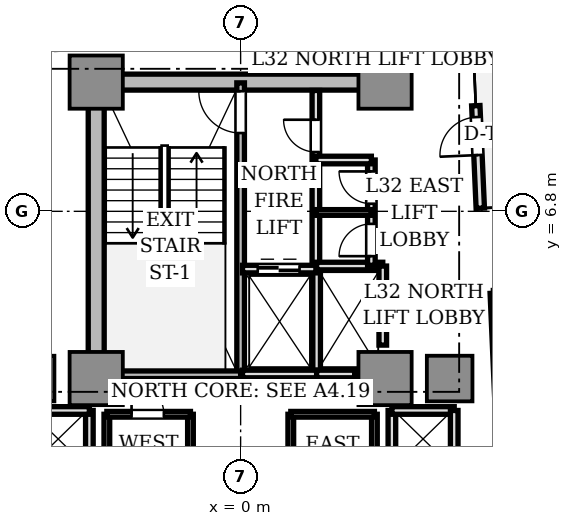
"""IFC4 building model, lengths in metres.
Left out: names, types, materials, properties, quantities, classifications, styles, units other than length and angle.
Written with IfcOpenShell. Run it as: python <this file> out.ifc"""

import sys

from ifc_helpers import new_model, si_unit, direction, frame, frame_2d, origin, origin_2d, place, context, subcontext, project, spatial, rectangle, extrude, source, transform, mapped, element, fill, save


model = new_model("IFC4")
c1 = context("Model", 3, precision=1e-05, world=origin(), true_north=direction((0.0, 1.0)))
c2 = subcontext(c1, "Body", "Model", "MODEL_VIEW")
j1 = project(units=[si_unit("LENGTHUNIT", "METRE"), si_unit("PLANEANGLEUNIT", "RADIAN")], contexts=[c1])
p1 = place(None, origin())
s1 = spatial("IfcSite", under=j1, at=p1, CompositionType="ELEMENT")
p2 = place(p1, origin())
s2 = spatial("IfcBuilding", under=s1, at=p2, CompositionType="ELEMENT")
p3 = place(p2, frame((0.0, 0.0, 118.15)))
s3 = spatial("IfcBuildingStorey", under=s2, at=p3, CompositionType="ELEMENT", Elevation=118.15)
p4 = place(p3, frame((-3.55, 10.2, 0.0), z_axis=(0.0, 0.0, 1.0), x_axis=(1.0, 0.0, 0.0)))
e1 = element("IfcWall", 1, at=p4, inside=s3, PredefinedType="SHEAR", context=c2, shape_type="SweptSolid", body=[
    extrude(rectangle(XDim=7.1, YDim=0.42, at=frame_2d((3.55, 0.0))), origin(), (0.0, 0.0, 1.0), 3.11),
])
p5 = place(p3, frame((-3.8, 2.85, 0.0), z_axis=(0.0, 0.0, 1.0), x_axis=(0.0, 1.0, 0.0)))
e2 = element("IfcWall", 2, at=p5, inside=s3, PredefinedType="SHEAR", context=c2, shape_type="SweptSolid", body=[
    extrude(rectangle(XDim=6.9, YDim=0.42, at=frame_2d((3.45, 0.0))), origin(), (0.0, 0.0, 1.0), 3.11),
])
m1 = source(origin(), c2, "Body", "SweptSolid", [
    extrude(rectangle(XDim=1.4, YDim=1.4, at=origin_2d()), origin(), (0.0, 0.0, 1.0), 3.11),
])
for number, where, z_axis, x_axis in (
    (3, (-3.8, 2.4, 0.0), (0.0, 0.0, 1.0), (1.0, 0.0, 0.0)),
    (4, (3.8, 2.4, 0.0), (0.0, 0.0, 1.0), (1.0, 0.0, 0.0)),
    (5, (-3.8, 10.2, 0.0), (0.0, 0.0, 1.0), (1.0, 0.0, 0.0)),
    (6, (3.8, 10.2, 0.0), (0.0, 0.0, 1.0), (1.0, 0.0, 0.0)),
):
    element("IfcColumn", number, at=place(p3, frame(where, z_axis=z_axis, x_axis=x_axis)), inside=s3, PredefinedType="COLUMN", context=c2, shape_type="MappedRepresentation", body=[
        mapped(m1, transform((0.0, 0.0, 0.0), scale=1.0)),
    ])
m2 = source(origin(), c2, "Body", "SweptSolid", [
    extrude(rectangle(XDim=1.2, YDim=1.2, at=origin_2d()), origin(), (0.0, 0.0, 1.0), 3.11),
])
for number, where, z_axis, x_axis in (
    (7, (5.5, 2.4, 0.0), (0.0, 0.0, 1.0), (1.0, 0.0, 0.0)),
    (8, (-5.5, 2.4, 0.0), (0.0, 0.0, 1.0), (1.0, 0.0, 0.0)),
):
    element("IfcColumn", number, at=place(p3, frame(where, z_axis=z_axis, x_axis=x_axis)), inside=s3, PredefinedType="COLUMN", context=c2, shape_type="MappedRepresentation", body=[
        mapped(m2, transform((0.0, 0.0, 0.0), scale=1.0)),
    ])
p6 = place(p3, frame((6.306, 6.882, 0.0), z_axis=(0.0, 0.0, 1.0), x_axis=(-0.043672655174, 0.999045894436, 0.0)))
e9 = element("IfcWall", 9, at=p6, inside=s3, PredefinedType="STANDARD", context=c2, shape_type="SweptSolid", body=[
    extrude(rectangle(XDim=2.7, YDim=0.22, at=frame_2d((1.35, 0.0))), origin(), (0.0, 0.0, 1.0), 3.11),
])
p7 = place(p6, frame((1.4, 0.0, 0.0)))
e10 = element("IfcOpeningElement", 10, at=p7, cuts=e9, PredefinedType="OPENING", context=c2, shape_type="SweptSolid", body=[
    extrude(rectangle(XDim=1.0, YDim=2.2, at=frame_2d((0.5, 1.1))), frame((0.0, 0.12, 0.0), z_axis=(0.0, -1.0, 0.0), x_axis=(1.0, 0.0, 0.0)), (0.0, 0.0, 1.0), 0.24),
])
p8 = place(p3, frame((0.0, 2.5, 0.0), z_axis=(0.0, 0.0, 1.0), x_axis=(0.0, 1.0, 0.0)))
e11 = element("IfcWall", 11, at=p8, inside=s3, PredefinedType="SOLIDWALL", context=c2, shape_type="SweptSolid", body=[
    extrude(rectangle(XDim=7.68, YDim=0.2, at=frame_2d((3.84, 0.0))), origin(), (0.0, 0.0, 1.0), 3.11),
])
p9 = place(p8, frame((6.36, 0.0, 0.0)))
e12 = element("IfcOpeningElement", 12, at=p9, cuts=e11, PredefinedType="OPENING", context=c2, shape_type="SweptSolid", body=[
    extrude(rectangle(XDim=1.1, YDim=2.15, at=frame_2d((0.55, 1.075))), frame((0.0, 0.11, 0.0), z_axis=(0.0, -1.0, 0.0), x_axis=(1.0, 0.0, 0.0)), (0.0, 0.0, 1.0), 0.22),
])
p10 = place(p3, frame((-3.72, 2.5, 0.0), z_axis=(0.0, 0.0, 1.0), x_axis=(1.0, 0.0, 0.0)))
e13 = element("IfcWall", 13, at=p10, inside=s3, PredefinedType="SOLIDWALL", context=c2, shape_type="SweptSolid", body=[
    extrude(rectangle(XDim=3.72, YDim=0.2, at=frame_2d((1.86, 0.0))), origin(), (0.0, 0.0, 1.0), 3.11),
])
p11 = place(p3, frame((1.98, 5.32, 0.0), z_axis=(0.0, 0.0, 1.0), x_axis=(0.0, 1.0, 0.0)))
e14 = element("IfcWall", 14, at=p11, inside=s3, PredefinedType="SOLIDWALL", context=c2, shape_type="SweptSolid", body=[
    extrude(rectangle(XDim=4.66, YDim=0.2, at=frame_2d((2.33, 0.0))), origin(), (0.0, 0.0, 1.0), 2.66),
])
p12 = place(p11, frame((3.04, 0.0, 0.0)))
e15 = element("IfcOpeningElement", 15, at=p12, cuts=e14, PredefinedType="OPENING", context=c2, shape_type="SweptSolid", body=[
    extrude(rectangle(XDim=0.85, YDim=2.1, at=frame_2d((0.425, 1.05))), frame((0.0, 0.11, 0.0), z_axis=(0.0, -1.0, 0.0), x_axis=(1.0, 0.0, 0.0)), (0.0, 0.0, 1.0), 0.22),
])
p13 = place(p3, frame((2.0, 2.5, 0.0), z_axis=(0.0, 0.0, 1.0), x_axis=(0.0, 1.0, 0.0)))
e16 = element("IfcWall", 16, at=p13, inside=s3, PredefinedType="SOLIDWALL", context=c2, shape_type="SweptSolid", body=[
    extrude(rectangle(XDim=2.78, YDim=0.2, at=frame_2d((1.39, 0.0))), origin(), (0.0, 0.0, 1.0), 2.66),
])
p14 = place(p3, frame((0.05, 2.52, 0.0), z_axis=(0.0, 0.0, 1.0), x_axis=(1.0, 0.0, 0.0)))
e17 = element("IfcWall", 17, at=p14, inside=s3, PredefinedType="SOLIDWALL", context=c2, shape_type="SweptSolid", body=[
    extrude(rectangle(XDim=1.95, YDim=0.2, at=frame_2d((0.975, 0.0))), origin(), (0.0, 0.0, 1.0), 2.66),
])
p15 = place(p3, frame((0.05, 5.28, 0.0), z_axis=(0.0, 0.0, 1.0), x_axis=(1.0, 0.0, 0.0)))
e18 = element("IfcWall", 18, at=p15, inside=s3, PredefinedType="SOLIDWALL", context=c2, shape_type="SweptSolid", body=[
    extrude(rectangle(XDim=1.93, YDim=0.2, at=frame_2d((0.965, 0.0))), origin(), (0.0, 0.0, 1.0), 2.66),
])
p16 = place(p15, frame((0.4, 0.0, 0.0)))
e19 = element("IfcOpeningElement", 19, at=p16, cuts=e18, PredefinedType="OPENING", context=c2, shape_type="SweptSolid", body=[
    extrude(rectangle(XDim=1.1, YDim=2.2, at=frame_2d((0.55, 1.1))), frame((0.0, 0.11, 0.0), z_axis=(0.0, -1.0, 0.0), x_axis=(1.0, 0.0, 0.0)), (0.0, 0.0, 1.0), 0.22),
])
p17 = place(p3, frame((2.0, 2.52, 0.0), z_axis=(0.0, 0.0, 1.0), x_axis=(1.0, 0.0, 0.0)))
e20 = element("IfcWall", 20, at=p17, inside=s3, PredefinedType="SOLIDWALL", context=c2, shape_type="SweptSolid", body=[
    extrude(rectangle(XDim=1.0, YDim=0.2, at=frame_2d((0.5, 0.0))), origin(), (0.0, 0.0, 1.0), 2.66),
])
p18 = place(p3, frame((2.0, 5.36, 0.0), z_axis=(0.0, 0.0, 1.0), x_axis=(1.0, 0.0, 0.0)))
e21 = element("IfcWall", 21, at=p18, inside=s3, PredefinedType="SOLIDWALL", context=c2, shape_type="SweptSolid", body=[
    extrude(rectangle(XDim=1.74, YDim=0.2, at=frame_2d((0.87, 0.0))), origin(), (0.0, 0.0, 1.0), 2.66),
])
p19 = place(p3, frame((3.74, 3.28, 0.0), z_axis=(0.0, 0.0, 1.0), x_axis=(0.0, 1.0, 0.0)))
e22 = element("IfcWall", 22, at=p19, inside=s3, PredefinedType="SOLIDWALL", context=c2, shape_type="SweptSolid", body=[
    extrude(rectangle(XDim=2.08, YDim=0.2, at=frame_2d((1.04, 0.0))), origin(), (0.0, 0.0, 1.0), 2.66),
])
p20 = place(p19, frame((0.44, 0.0, 0.0)))
e23 = element("IfcOpeningElement", 23, at=p20, cuts=e22, PredefinedType="OPENING", context=c2, shape_type="SweptSolid", body=[
    extrude(rectangle(XDim=1.2, YDim=2.2, at=frame_2d((0.6, 1.1))), frame((0.0, 0.11, 0.0), z_axis=(0.0, -1.0, 0.0), x_axis=(1.0, 0.0, 0.0)), (0.0, 0.0, 1.0), 0.22),
])
p21 = place(p3, frame((3.98, -1.56, 0.0), z_axis=(0.0, 0.0, 1.0), x_axis=(0.0, 1.0, 0.0)))
e24 = element("IfcWall", 24, at=p21, inside=s3, PredefinedType="SOLIDWALL", context=c2, shape_type="SweptSolid", body=[
    extrude(rectangle(XDim=3.12, YDim=0.2, at=frame_2d((1.56, 0.0))), origin(), (0.0, 0.0, 1.0), 2.28),
])
p22 = place(p3, frame((3.98, 1.56, 0.0), z_axis=(0.0, 0.0, 1.0), x_axis=(1.0, 0.0, 0.0)))
e25 = element("IfcWall", 25, at=p22, inside=s3, PredefinedType="SOLIDWALL", context=c2, shape_type="SweptSolid", body=[
    extrude(rectangle(XDim=1.64, YDim=0.2, at=frame_2d((0.82, 0.0))), origin(), (0.0, 0.0, 1.0), 2.66),
])
p23 = place(p3, frame((5.62, 0.0, 0.0), z_axis=(0.0, 0.0, 1.0), x_axis=(0.0, 1.0, 0.0)))
e26 = element("IfcWall", 26, at=p23, inside=s3, PredefinedType="SOLIDWALL", context=c2, shape_type="SweptSolid", body=[
    extrude(rectangle(XDim=1.56, YDim=0.2, at=frame_2d((0.78, 0.0))), origin(), (0.0, 0.0, 1.0), 2.66),
])
p24 = place(p3, frame((-3.98, -1.56, 0.0), z_axis=(0.0, 0.0, 1.0), x_axis=(0.0, 1.0, 0.0)))
e27 = element("IfcWall", 27, at=p24, inside=s3, PredefinedType="SOLIDWALL", context=c2, shape_type="SweptSolid", body=[
    extrude(rectangle(XDim=3.12, YDim=0.2, at=frame_2d((1.56, 0.0))), origin(), (0.0, 0.0, 1.0), 2.28),
])
p25 = place(p3, frame((-5.62, 1.56, 0.0), z_axis=(0.0, 0.0, 1.0), x_axis=(1.0, 0.0, 0.0)))
e28 = element("IfcWall", 28, at=p25, inside=s3, PredefinedType="SOLIDWALL", context=c2, shape_type="SweptSolid", body=[
    extrude(rectangle(XDim=1.64, YDim=0.2, at=frame_2d((0.82, 0.0))), origin(), (0.0, 0.0, 1.0), 2.66),
])
p26 = place(p3, frame((3.44, 5.38, 0.0), z_axis=(0.0, 0.0, 1.0), x_axis=(0.0, 1.0, 0.0)))
e29 = element("IfcWall", 29, at=p26, inside=s3, PredefinedType="SOLIDWALL", context=c2, shape_type="SweptSolid", body=[
    extrude(rectangle(XDim=2.77, YDim=0.2, at=frame_2d((1.385, 0.0))), origin(), (0.0, 0.0, 1.0), 2.66),
])
p27 = place(p26, frame((0.24, 0.0, 0.0)))
e30 = element("IfcOpeningElement", 30, at=p27, cuts=e29, PredefinedType="OPENING", context=c2, shape_type="SweptSolid", body=[
    extrude(rectangle(XDim=0.85, YDim=2.1, at=frame_2d((0.425, 1.05))), frame((0.0, 0.11, 0.0), z_axis=(0.0, -1.0, 0.0), x_axis=(1.0, 0.0, 0.0)), (0.0, 0.0, 1.0), 0.22),
])
p28 = place(p26, frame((1.62, 0.0, 0.0)))
e31 = element("IfcOpeningElement", 31, at=p28, cuts=e29, PredefinedType="OPENING", context=c2, shape_type="SweptSolid", body=[
    extrude(rectangle(XDim=0.85, YDim=2.1, at=frame_2d((0.425, 1.05))), frame((0.0, 0.11, 0.0), z_axis=(0.0, -1.0, 0.0), x_axis=(1.0, 0.0, 0.0)), (0.0, 0.0, 1.0), 0.22),
])
p29 = place(p3, frame((1.98, 8.15, 0.0), z_axis=(0.0, 0.0, 1.0), x_axis=(1.0, 0.0, 0.0)))
e32 = element("IfcWall", 32, at=p29, inside=s3, PredefinedType="SOLIDWALL", context=c2, shape_type="SweptSolid", body=[
    extrude(rectangle(XDim=1.46, YDim=0.2, at=frame_2d((0.73, 0.0))), origin(), (0.0, 0.0, 1.0), 2.66),
])
p30 = place(p3, frame((1.98, 6.77, 0.0), z_axis=(0.0, 0.0, 1.0), x_axis=(1.0, 0.0, 0.0)))
e33 = element("IfcWall", 33, at=p30, inside=s3, PredefinedType="PARTITIONING", context=c2, shape_type="SweptSolid", body=[
    extrude(rectangle(XDim=1.46, YDim=0.15, at=frame_2d((0.73, 0.0))), origin(), (0.0, 0.0, 1.0), 2.66),
])
p31 = place(p3, frame((-1.32, -1.46, 0.0), z_axis=(0.0, 0.0, 1.0), x_axis=(0.0, 1.0, 0.0)))
e34 = element("IfcWall", 34, at=p31, inside=s3, PredefinedType="PARTITIONING", context=c2, shape_type="SweptSolid", body=[
    extrude(rectangle(XDim=2.92, YDim=0.15, at=frame_2d((1.46, 0.0))), origin(), (0.0, 0.0, 1.0), 2.66),
])
p32 = place(p3, frame((-3.52, -1.46, 0.0), z_axis=(0.0, 0.0, 1.0), x_axis=(0.0, 1.0, 0.0)))
e35 = element("IfcWall", 35, at=p32, inside=s3, PredefinedType="PARTITIONING", context=c2, shape_type="SweptSolid", body=[
    extrude(rectangle(XDim=2.92, YDim=0.15, at=frame_2d((1.46, 0.0))), origin(), (0.0, 0.0, 1.0), 2.28),
])
p33 = place(p3, frame((-3.52, 1.46, 0.0), z_axis=(0.0, 0.0, 1.0), x_axis=(1.0, 0.0, 0.0)))
e36 = element("IfcWall", 36, at=p33, inside=s3, PredefinedType="PARTITIONING", context=c2, shape_type="SweptSolid", body=[
    extrude(rectangle(XDim=2.2, YDim=0.15, at=frame_2d((1.1, 0.0))), origin(), (0.0, 0.0, 1.0), 2.66),
])
p34 = place(p33, frame((0.65, 0.0, 0.0)))
e37 = element("IfcOpeningElement", 37, at=p34, cuts=e36, PredefinedType="OPENING", context=c2, shape_type="SweptSolid", body=[
    extrude(rectangle(XDim=0.85, YDim=2.1, at=frame_2d((0.425, 1.05))), frame((0.0, 0.085, 0.0), z_axis=(0.0, -1.0, 0.0), x_axis=(1.0, 0.0, 0.0)), (0.0, 0.0, 1.0), 0.17),
])
p35 = place(p3, frame((1.32, -1.46, 0.0), z_axis=(0.0, 0.0, 1.0), x_axis=(0.0, 1.0, 0.0)))
e38 = element("IfcWall", 38, at=p35, inside=s3, PredefinedType="PARTITIONING", context=c2, shape_type="SweptSolid", body=[
    extrude(rectangle(XDim=2.92, YDim=0.15, at=frame_2d((1.46, 0.0))), origin(), (0.0, 0.0, 1.0), 2.66),
])
p36 = place(p3, frame((3.52, -1.46, 0.0), z_axis=(0.0, 0.0, 1.0), x_axis=(0.0, 1.0, 0.0)))
e39 = element("IfcWall", 39, at=p36, inside=s3, PredefinedType="PARTITIONING", context=c2, shape_type="SweptSolid", body=[
    extrude(rectangle(XDim=2.92, YDim=0.15, at=frame_2d((1.46, 0.0))), origin(), (0.0, 0.0, 1.0), 2.28),
])
p37 = place(p3, frame((1.32, 1.46, 0.0), z_axis=(0.0, 0.0, 1.0), x_axis=(1.0, 0.0, 0.0)))
e40 = element("IfcWall", 40, at=p37, inside=s3, PredefinedType="PARTITIONING", context=c2, shape_type="SweptSolid", body=[
    extrude(rectangle(XDim=2.2, YDim=0.15, at=frame_2d((1.1, 0.0))), origin(), (0.0, 0.0, 1.0), 2.66),
])
p38 = place(p3, frame((7.129, -6.245, 0.0), z_axis=(0.0, 0.0, 1.0), x_axis=(-0.043608291235, 0.999048705988, 0.0)))
e41 = element("IfcWall", 41, at=p38, inside=s3, PredefinedType="PARTITIONING", context=c2, shape_type="SweptSolid", body=[
    extrude(rectangle(XDim=10.9, YDim=0.18, at=frame_2d((5.45, 0.0))), origin(), (0.0, 0.0, 1.0), 2.66),
])
m3 = source(origin(), c2, "Body", "SweptSolid", [
    extrude(rectangle(XDim=1.0, YDim=0.05, at=origin_2d()), origin(), (0.0, 0.0, 1.0), 2.2),
])
p39 = place(p7, frame((0.5, 0.0, 0.0)))
e42 = element("IfcDoor", 42, at=p39, inside=s3, OperationType="SINGLE_SWING_LEFT", PredefinedType="DOOR", context=c2, shape_type="MappedRepresentation", body=[
    mapped(m3, transform((0.0, 0.0, 0.0), scale=1.0)),
])
fill(e10, e42)
m4 = source(origin(), c2, "Body", "SweptSolid", [
    extrude(rectangle(XDim=1.1, YDim=0.05, at=origin_2d()), origin(), (0.0, 0.0, 1.0), 2.15),
])
p40 = place(p9, frame((0.55, 0.0, 0.0)))
e43 = element("IfcDoor", 43, at=p40, inside=s3, OperationType="SINGLE_SWING_RIGHT", PredefinedType="DOOR", context=c2, shape_type="MappedRepresentation", body=[
    mapped(m4, transform((0.0, 0.0, 0.0), scale=1.0)),
])
fill(e12, e43)
m5 = source(origin(), c2, "Body", "SweptSolid", [
    extrude(rectangle(XDim=0.85, YDim=0.05, at=origin_2d()), origin(), (0.0, 0.0, 1.0), 2.1),
])
p41 = place(p12, frame((0.425, 0.0, 0.0)))
e44 = element("IfcDoor", 44, at=p41, inside=s3, OperationType="SINGLE_SWING_RIGHT", PredefinedType="DOOR", context=c2, shape_type="MappedRepresentation", body=[
    mapped(m5, transform((0.0, 0.0, 0.0), scale=1.0)),
])
fill(e15, e44)
m6 = source(origin(), c2, "Body", "SweptSolid", [
    extrude(rectangle(XDim=1.1, YDim=0.05, at=origin_2d()), origin(), (0.0, 0.0, 1.0), 2.2),
])
p42 = place(p16, frame((0.55, 0.0, 0.0)))
e45 = element("IfcDoor", 45, at=p42, inside=s3, OperationType="DOUBLE_DOOR_SLIDING", PredefinedType="DOOR", context=c2, shape_type="MappedRepresentation", body=[
    mapped(m6, transform((0.0, 0.0, 0.0), scale=1.0)),
])
fill(e19, e45)
m7 = source(origin(), c2, "Body", "SweptSolid", [
    extrude(rectangle(XDim=1.2, YDim=0.05, at=origin_2d()), origin(), (0.0, 0.0, 1.0), 2.2),
])
p43 = place(p20, frame((0.6, 0.0, 0.0)))
e46 = element("IfcDoor", 46, at=p43, inside=s3, OperationType="DOUBLE_DOOR_SLIDING", PredefinedType="DOOR", context=c2, shape_type="MappedRepresentation", body=[
    mapped(m7, transform((0.0, 0.0, 0.0), scale=1.0)),
])
fill(e23, e46)
p44 = place(p27, frame((0.425, 0.0, 0.0)))
e47 = element("IfcDoor", 47, at=p44, inside=s3, OperationType="SINGLE_SWING_LEFT", PredefinedType="DOOR", context=c2, shape_type="MappedRepresentation", body=[
    mapped(m5, transform((0.0, 0.0, 0.0), scale=1.0)),
])
fill(e30, e47)
p45 = place(p28, frame((0.425, 0.0, 0.0)))
e48 = element("IfcDoor", 48, at=p45, inside=s3, OperationType="SINGLE_SWING_RIGHT", PredefinedType="DOOR", context=c2, shape_type="MappedRepresentation", body=[
    mapped(m5, transform((0.0, 0.0, 0.0), scale=1.0)),
])
fill(e31, e48)
p46 = place(p34, frame((0.425, 0.0, 0.0)))
e49 = element("IfcDoor", 49, at=p46, inside=s3, OperationType="SINGLE_SWING_LEFT", PredefinedType="DOOR", context=c2, shape_type="MappedRepresentation", body=[
    mapped(m5, transform((0.0, 0.0, 0.0), scale=1.0)),
])
fill(e37, e49)
save(model, sys.argv[1])
